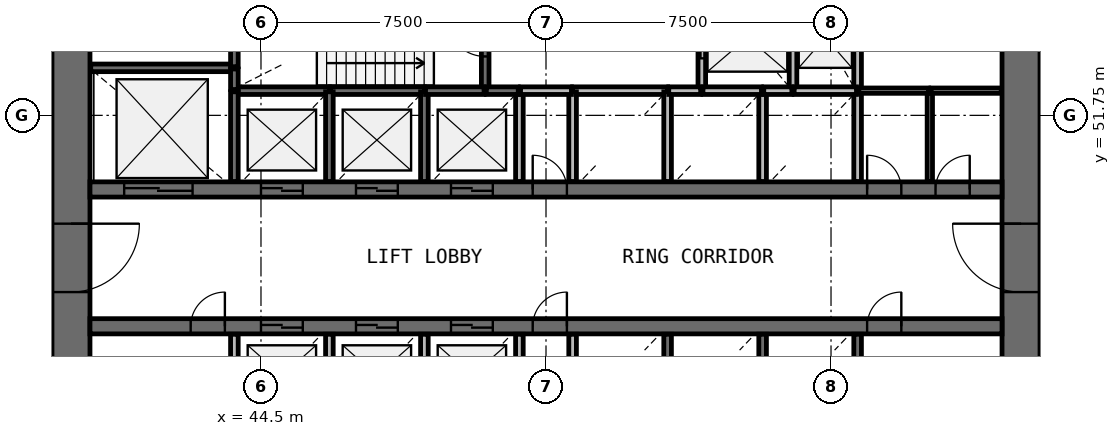
"""IFC4 building model, lengths in metres.
Left out: names, types, materials, properties, quantities, classifications, styles, units other than length and angle.
Written with IfcOpenShell. Run it as: python <this file> out.ifc"""

import sys

from ifc_helpers import new_model, si_unit, direction, frame, frame_2d, origin, place, context, subcontext, project, spatial, rectangle, extrude, source, transform, mapped, element, fill, save


model = new_model("IFC4")
c1 = context("Model", 3, precision=1e-05, world=origin(), true_north=direction((0.0, 1.0)))
c2 = subcontext(c1, "Body", "Model", "MODEL_VIEW")
j1 = project(units=[si_unit("LENGTHUNIT", "METRE"), si_unit("PLANEANGLEUNIT", "RADIAN")], contexts=[c1])
p1 = place(None, origin())
s1 = spatial("IfcSite", under=j1, at=p1, CompositionType="ELEMENT")
p2 = place(p1, origin())
s2 = spatial("IfcBuilding", under=s1, at=p2, CompositionType="ELEMENT")
p3 = place(p2, frame((0.0, 0.0, 66.6)))
s3 = spatial("IfcBuildingStorey", under=s2, at=p3, CompositionType="ELEMENT", Elevation=66.6)
p4 = place(p3, frame((64.5, 38.0, 0.0), z_axis=(0.0, 0.0, 1.0), x_axis=(0.0, 1.0, 0.0)))
e1 = element("IfcWall", 1, at=p4, inside=s3, PredefinedType="SHEAR", context=c2, shape_type="SweptSolid", body=[
    extrude(rectangle(XDim=20.0, YDim=1.0, at=frame_2d((10.0, 0.0))), origin(), (0.0, 0.0, 1.0), 4.4),
])
p5 = place(p4, frame((9.1, 0.0, 0.0)))
e2 = element("IfcOpeningElement", 2, at=p5, cuts=e1, PredefinedType="OPENING", context=c2, shape_type="SweptSolid", body=[
    extrude(rectangle(XDim=1.8, YDim=2.1, at=frame_2d((0.9, 1.05))), frame((0.0, 0.51, 0.0), z_axis=(0.0, -1.0, 0.0), x_axis=(1.0, 0.0, 0.0)), (0.0, 0.0, 1.0), 1.02),
])
p6 = place(p3, frame((39.5, 58.0, 0.0), z_axis=(0.0, 0.0, 1.0), x_axis=(0.0, -1.0, 0.0)))
e3 = element("IfcWall", 3, at=p6, inside=s3, PredefinedType="SHEAR", context=c2, shape_type="SweptSolid", body=[
    extrude(rectangle(XDim=20.0, YDim=1.0, at=frame_2d((10.0, 0.0))), origin(), (0.0, 0.0, 1.0), 4.4),
])
p7 = place(p6, frame((9.1, 0.0, 0.0)))
e4 = element("IfcOpeningElement", 4, at=p7, cuts=e3, PredefinedType="OPENING", context=c2, shape_type="SweptSolid", body=[
    extrude(rectangle(XDim=1.8, YDim=2.1, at=frame_2d((0.9, 1.05))), frame((0.0, 0.51, 0.0), z_axis=(0.0, -1.0, 0.0), x_axis=(1.0, 0.0, 0.0)), (0.0, 0.0, 1.0), 1.02),
])
p8 = place(p3, frame((40.0, 49.8, 0.0), z_axis=(0.0, 0.0, 1.0), x_axis=(1.0, 0.0, 0.0)))
e5 = element("IfcWall", 5, at=p8, inside=s3, PredefinedType="SHEAR", context=c2, shape_type="SweptSolid", body=[
    extrude(rectangle(XDim=24.0, YDim=0.4, at=frame_2d((12.0, 0.0))), origin(), (0.0, 0.0, 1.0), 4.4),
])
p9 = place(p8, frame((4.5, 0.0, 0.0)))
e6 = element("IfcOpeningElement", 6, at=p9, cuts=e5, PredefinedType="OPENING", context=c2, shape_type="SweptSolid", body=[
    extrude(rectangle(XDim=1.1, YDim=2.1, at=frame_2d((0.55, 1.05))), frame((0.0, 0.21, 0.0), z_axis=(0.0, -1.0, 0.0), x_axis=(1.0, 0.0, 0.0)), (0.0, 0.0, 1.0), 0.42),
])
p10 = place(p8, frame((7.0, 0.0, 0.0)))
e7 = element("IfcOpeningElement", 7, at=p10, cuts=e5, PredefinedType="OPENING", context=c2, shape_type="SweptSolid", body=[
    extrude(rectangle(XDim=1.1, YDim=2.1, at=frame_2d((0.55, 1.05))), frame((0.0, 0.21, 0.0), z_axis=(0.0, -1.0, 0.0), x_axis=(1.0, 0.0, 0.0)), (0.0, 0.0, 1.0), 0.42),
])
p11 = place(p8, frame((9.5, 0.0, 0.0)))
e8 = element("IfcOpeningElement", 8, at=p11, cuts=e5, PredefinedType="OPENING", context=c2, shape_type="SweptSolid", body=[
    extrude(rectangle(XDim=1.1, YDim=2.1, at=frame_2d((0.55, 1.05))), frame((0.0, 0.21, 0.0), z_axis=(0.0, -1.0, 0.0), x_axis=(1.0, 0.0, 0.0)), (0.0, 0.0, 1.0), 0.42),
])
p12 = place(p8, frame((0.9, 0.0, 0.0)))
e9 = element("IfcOpeningElement", 9, at=p12, cuts=e5, PredefinedType="OPENING", context=c2, shape_type="SweptSolid", body=[
    extrude(rectangle(XDim=1.8, YDim=2.4, at=frame_2d((0.9, 1.2))), frame((0.0, 0.21, 0.0), z_axis=(0.0, -1.0, 0.0), x_axis=(1.0, 0.0, 0.0)), (0.0, 0.0, 1.0), 0.42),
])
p13 = place(p8, frame((20.45, 0.0, 0.0)))
e10 = element("IfcOpeningElement", 10, at=p13, cuts=e5, PredefinedType="OPENING", context=c2, shape_type="SweptSolid", body=[
    extrude(rectangle(XDim=0.9, YDim=2.1, at=frame_2d((0.45, 1.05))), frame((0.0, 0.21, 0.0), z_axis=(0.0, -1.0, 0.0), x_axis=(1.0, 0.0, 0.0)), (0.0, 0.0, 1.0), 0.42),
])
p14 = place(p8, frame((22.25, 0.0, 0.0)))
e11 = element("IfcOpeningElement", 11, at=p14, cuts=e5, PredefinedType="OPENING", context=c2, shape_type="SweptSolid", body=[
    extrude(rectangle(XDim=0.9, YDim=2.1, at=frame_2d((0.45, 1.05))), frame((0.0, 0.21, 0.0), z_axis=(0.0, -1.0, 0.0), x_axis=(1.0, 0.0, 0.0)), (0.0, 0.0, 1.0), 0.42),
])
p15 = place(p8, frame((11.65, 0.0, 0.0)))
e12 = element("IfcOpeningElement", 12, at=p15, cuts=e5, PredefinedType="OPENING", context=c2, shape_type="SweptSolid", body=[
    extrude(rectangle(XDim=0.9, YDim=2.1, at=frame_2d((0.45, 1.05))), frame((0.0, 0.21, 0.0), z_axis=(0.0, -1.0, 0.0), x_axis=(1.0, 0.0, 0.0)), (0.0, 0.0, 1.0), 0.42),
])
p16 = place(p3, frame((40.0, 46.2, 0.0), z_axis=(0.0, 0.0, 1.0), x_axis=(1.0, 0.0, 0.0)))
e13 = element("IfcWall", 13, at=p16, inside=s3, PredefinedType="SHEAR", context=c2, shape_type="SweptSolid", body=[
    extrude(rectangle(XDim=24.0, YDim=0.4, at=frame_2d((12.0, 0.0))), origin(), (0.0, 0.0, 1.0), 4.4),
])
p17 = place(p16, frame((4.5, 0.0, 0.0)))
e14 = element("IfcOpeningElement", 14, at=p17, cuts=e13, PredefinedType="OPENING", context=c2, shape_type="SweptSolid", body=[
    extrude(rectangle(XDim=1.1, YDim=2.1, at=frame_2d((0.55, 1.05))), frame((0.0, 0.21, 0.0), z_axis=(0.0, -1.0, 0.0), x_axis=(1.0, 0.0, 0.0)), (0.0, 0.0, 1.0), 0.42),
])
p18 = place(p16, frame((7.0, 0.0, 0.0)))
e15 = element("IfcOpeningElement", 15, at=p18, cuts=e13, PredefinedType="OPENING", context=c2, shape_type="SweptSolid", body=[
    extrude(rectangle(XDim=1.1, YDim=2.1, at=frame_2d((0.55, 1.05))), frame((0.0, 0.21, 0.0), z_axis=(0.0, -1.0, 0.0), x_axis=(1.0, 0.0, 0.0)), (0.0, 0.0, 1.0), 0.42),
])
p19 = place(p16, frame((9.5, 0.0, 0.0)))
e16 = element("IfcOpeningElement", 16, at=p19, cuts=e13, PredefinedType="OPENING", context=c2, shape_type="SweptSolid", body=[
    extrude(rectangle(XDim=1.1, YDim=2.1, at=frame_2d((0.55, 1.05))), frame((0.0, 0.21, 0.0), z_axis=(0.0, -1.0, 0.0), x_axis=(1.0, 0.0, 0.0)), (0.0, 0.0, 1.0), 0.42),
])
p20 = place(p16, frame((20.45, 0.0, 0.0)))
e17 = element("IfcOpeningElement", 17, at=p20, cuts=e13, PredefinedType="OPENING", context=c2, shape_type="SweptSolid", body=[
    extrude(rectangle(XDim=0.9, YDim=2.1, at=frame_2d((0.45, 1.05))), frame((0.0, 0.21, 0.0), z_axis=(0.0, -1.0, 0.0), x_axis=(1.0, 0.0, 0.0)), (0.0, 0.0, 1.0), 0.42),
])
p21 = place(p16, frame((2.65, 0.0, 0.0)))
e18 = element("IfcOpeningElement", 18, at=p21, cuts=e13, PredefinedType="OPENING", context=c2, shape_type="SweptSolid", body=[
    extrude(rectangle(XDim=0.9, YDim=2.1, at=frame_2d((0.45, 1.05))), frame((0.0, 0.21, 0.0), z_axis=(0.0, -1.0, 0.0), x_axis=(1.0, 0.0, 0.0)), (0.0, 0.0, 1.0), 0.42),
])
p22 = place(p16, frame((11.65, 0.0, 0.0)))
e19 = element("IfcOpeningElement", 19, at=p22, cuts=e13, PredefinedType="OPENING", context=c2, shape_type="SweptSolid", body=[
    extrude(rectangle(XDim=0.9, YDim=2.1, at=frame_2d((0.45, 1.05))), frame((0.0, 0.21, 0.0), z_axis=(0.0, -1.0, 0.0), x_axis=(1.0, 0.0, 0.0)), (0.0, 0.0, 1.0), 0.42),
])
p23 = place(p3, frame((43.8, 53.0, 0.0), z_axis=(0.0, 0.0, 1.0), x_axis=(-1.0, 0.0, 0.0)))
e20 = element("IfcWall", 20, at=p23, inside=s3, PredefinedType="SOLIDWALL", context=c2, shape_type="SweptSolid", body=[
    extrude(rectangle(XDim=3.78, YDim=0.2, at=frame_2d((1.89, 0.0))), origin(), (0.0, 0.0, 1.0), 3.95),
])
p24 = place(p3, frame((50.4, 52.4, 0.0), z_axis=(0.0, 0.0, 1.0), x_axis=(0.0, 1.0, 0.0)))
e21 = element("IfcWall", 21, at=p24, inside=s3, PredefinedType="SOLIDWALL", context=c2, shape_type="SweptSolid", body=[
    extrude(rectangle(XDim=2.77, YDim=0.2, at=frame_2d((1.385, 0.0))), origin(), (0.0, 0.0, 1.0), 3.95),
])
p25 = place(p24, frame((0.9, 0.0, 0.0)))
e22 = element("IfcOpeningElement", 22, at=p25, cuts=e21, PredefinedType="OPENING", context=c2, shape_type="SweptSolid", body=[
    extrude(rectangle(XDim=1.0, YDim=2.1, at=frame_2d((0.5, 1.05))), frame((0.0, 0.11, 0.0), z_axis=(0.0, -1.0, 0.0), x_axis=(1.0, 0.0, 0.0)), (0.0, 0.0, 1.0), 0.22),
])
p26 = place(p3, frame((56.1, 55.17, 0.0), z_axis=(0.0, 0.0, 1.0), x_axis=(0.0, -1.0, 0.0)))
e23 = element("IfcWall", 23, at=p26, inside=s3, PredefinedType="SOLIDWALL", context=c2, shape_type="SweptSolid", body=[
    extrude(rectangle(XDim=2.77, YDim=0.2, at=frame_2d((1.385, 0.0))), origin(), (0.0, 0.0, 1.0), 3.95),
])
p27 = place(p26, frame((0.82, 0.0, 0.0)))
e24 = element("IfcOpeningElement", 24, at=p27, cuts=e23, PredefinedType="OPENING", context=c2, shape_type="SweptSolid", body=[
    extrude(rectangle(XDim=1.1, YDim=2.1, at=frame_2d((0.55, 1.05))), frame((0.0, 0.11, 0.0), z_axis=(0.0, -1.0, 0.0), x_axis=(1.0, 0.0, 0.0)), (0.0, 0.0, 1.0), 0.22),
])
for number, where, z_axis, x_axis in (
    (25, (58.5, 52.4, 0.0), (0.0, 0.0, 1.0), (0.0, 1.0, 0.0)),
    (26, (60.2, 52.4, 0.0), (0.0, 0.0, 1.0), (0.0, 1.0, 0.0)),
):
    element("IfcWall", number, at=place(p3, frame(where, z_axis=z_axis, x_axis=x_axis)), inside=s3, PredefinedType="SOLIDWALL", context=c2, shape_type="SweptSolid", body=[
        extrude(rectangle(XDim=2.8, YDim=0.2, at=frame_2d((1.4, 0.0))), origin(), (0.0, 0.0, 1.0), 3.95),
    ])
p28 = place(p3, frame((46.3, 52.4, 0.0), z_axis=(0.0, 0.0, 1.0), x_axis=(-1.0, 0.0, 0.0)))
e27 = element("IfcWall", 27, at=p28, inside=s3, PredefinedType="SOLIDWALL", context=c2, shape_type="SweptSolid", body=[
    extrude(rectangle(XDim=2.5, YDim=0.2, at=frame_2d((1.25, 0.0))), origin(), (0.0, 0.0, 1.0), 3.95),
])
p29 = place(p3, frame((48.8, 52.4, 0.0), z_axis=(0.0, 0.0, 1.0), x_axis=(-1.0, 0.0, 0.0)))
e28 = element("IfcWall", 28, at=p29, inside=s3, PredefinedType="SOLIDWALL", context=c2, shape_type="SweptSolid", body=[
    extrude(rectangle(XDim=2.47, YDim=0.2, at=frame_2d((1.235, 0.0))), origin(), (0.0, 0.0, 1.0), 3.95),
])
p30 = place(p3, frame((55.2, 52.4, 0.0), z_axis=(0.0, 0.0, 1.0), x_axis=(-1.0, 0.0, 0.0)))
e29 = element("IfcWall", 29, at=p30, inside=s3, PredefinedType="SOLIDWALL", context=c2, shape_type="SweptSolid", body=[
    extrude(rectangle(XDim=2.5, YDim=0.2, at=frame_2d((1.25, 0.0))), origin(), (0.0, 0.0, 1.0), 3.95),
])
for number, where, z_axis, x_axis in (
    (30, (43.8, 45.99, 0.0), (0.0, 0.0, 1.0), (0.0, -1.0, 0.0)),
    (31, (43.8, 52.37, 0.0), (0.0, 0.0, 1.0), (0.0, -1.0, 0.0)),
):
    element("IfcWall", number, at=place(p3, frame(where, z_axis=z_axis, x_axis=x_axis)), inside=s3, PredefinedType="SOLIDWALL", context=c2, shape_type="SweptSolid", body=[
        extrude(rectangle(XDim=2.36, YDim=0.2, at=frame_2d((1.18, 0.0))), origin(), (0.0, 0.0, 1.0), 3.95),
    ])
p31 = place(p3, frame((46.3, 43.6, 0.0), z_axis=(0.0, 0.0, 1.0), x_axis=(0.0, 1.0, 0.0)))
e32 = element("IfcWall", 32, at=p31, inside=s3, PredefinedType="SOLIDWALL", context=c2, shape_type="SweptSolid", body=[
    extrude(rectangle(XDim=2.39, YDim=0.2, at=frame_2d((1.195, 0.0))), origin(), (0.0, 0.0, 1.0), 3.95),
])
for number, where, z_axis, x_axis in (
    (33, (46.3, 50.01, 0.0), (0.0, 0.0, 1.0), (0.0, 1.0, 0.0)),
    (34, (48.8, 43.63, 0.0), (0.0, 0.0, 1.0), (0.0, 1.0, 0.0)),
    (35, (48.8, 50.01, 0.0), (0.0, 0.0, 1.0), (0.0, 1.0, 0.0)),
    (36, (51.3, 43.63, 0.0), (0.0, 0.0, 1.0), (0.0, 1.0, 0.0)),
):
    element("IfcWall", number, at=place(p3, frame(where, z_axis=z_axis, x_axis=x_axis)), inside=s3, PredefinedType="SOLIDWALL", context=c2, shape_type="SweptSolid", body=[
        extrude(rectangle(XDim=2.36, YDim=0.2, at=frame_2d((1.18, 0.0))), origin(), (0.0, 0.0, 1.0), 3.95),
    ])
for number, where, z_axis, x_axis in (
    (37, (51.3, 50.01, 0.0), (0.0, 0.0, 1.0), (0.0, 1.0, 0.0)),
    (38, (52.7, 45.99, 0.0), (0.0, 0.0, 1.0), (0.0, -1.0, 0.0)),
):
    element("IfcWall", number, at=place(p3, frame(where, z_axis=z_axis, x_axis=x_axis)), inside=s3, PredefinedType="SOLIDWALL", context=c2, shape_type="SweptSolid", body=[
        extrude(rectangle(XDim=2.39, YDim=0.2, at=frame_2d((1.195, 0.0))), origin(), (0.0, 0.0, 1.0), 3.95),
    ])
for number, where, z_axis, x_axis in (
    (39, (52.7, 52.37, 0.0), (0.0, 0.0, 1.0), (0.0, -1.0, 0.0)),
    (40, (55.2, 43.63, 0.0), (0.0, 0.0, 1.0), (0.0, 1.0, 0.0)),
    (41, (55.2, 50.01, 0.0), (0.0, 0.0, 1.0), (0.0, 1.0, 0.0)),
    (42, (57.7, 43.63, 0.0), (0.0, 0.0, 1.0), (0.0, 1.0, 0.0)),
):
    element("IfcWall", number, at=place(p3, frame(where, z_axis=z_axis, x_axis=x_axis)), inside=s3, PredefinedType="SOLIDWALL", context=c2, shape_type="SweptSolid", body=[
        extrude(rectangle(XDim=2.36, YDim=0.2, at=frame_2d((1.18, 0.0))), origin(), (0.0, 0.0, 1.0), 3.95),
    ])
p32 = place(p3, frame((57.7, 50.01, 0.0), z_axis=(0.0, 0.0, 1.0), x_axis=(0.0, 1.0, 0.0)))
e43 = element("IfcWall", 43, at=p32, inside=s3, PredefinedType="SOLIDWALL", context=c2, shape_type="SweptSolid", body=[
    extrude(rectangle(XDim=2.39, YDim=0.2, at=frame_2d((1.195, 0.0))), origin(), (0.0, 0.0, 1.0), 3.95),
])
for number, where, z_axis, x_axis in (
    (44, (60.2, 43.63, 0.0), (0.0, 0.0, 1.0), (0.0, 1.0, 0.0)),
    (45, (60.2, 50.01, 0.0), (0.0, 0.0, 1.0), (0.0, 1.0, 0.0)),
):
    element("IfcWall", number, at=place(p3, frame(where, z_axis=z_axis, x_axis=x_axis)), inside=s3, PredefinedType="SOLIDWALL", context=c2, shape_type="SweptSolid", body=[
        extrude(rectangle(XDim=2.36, YDim=0.2, at=frame_2d((1.18, 0.0))), origin(), (0.0, 0.0, 1.0), 3.95),
    ])
p33 = place(p3, frame((43.8, 55.17, 0.0), z_axis=(0.0, 0.0, 1.0), x_axis=(0.0, -1.0, 0.0)))
e46 = element("IfcWall", 46, at=p33, inside=s3, PredefinedType="SOLIDWALL", context=c2, shape_type="SweptSolid", body=[
    extrude(rectangle(XDim=2.14, YDim=0.2, at=frame_2d((1.07, 0.0))), origin(), (0.0, 0.0, 1.0), 3.95),
])
p34 = place(p3, frame((60.17, 52.4, 0.0), z_axis=(0.0, 0.0, 1.0), x_axis=(-1.0, 0.0, 0.0)))
e47 = element("IfcWall", 47, at=p34, inside=s3, PredefinedType="SOLIDWALL", context=c2, shape_type="SweptSolid", body=[
    extrude(rectangle(XDim=1.64, YDim=0.2, at=frame_2d((0.82, 0.0))), origin(), (0.0, 0.0, 1.0), 3.95),
])
for number, where, z_axis, x_axis in (
    (48, (50.37, 52.4, 0.0), (0.0, 0.0, 1.0), (-1.0, 0.0, 0.0)),
    (49, (57.67, 52.4, 0.0), (0.0, 0.0, 1.0), (-1.0, 0.0, 0.0)),
):
    element("IfcWall", number, at=place(p3, frame(where, z_axis=z_axis, x_axis=x_axis)), inside=s3, PredefinedType="SOLIDWALL", context=c2, shape_type="SweptSolid", body=[
        extrude(rectangle(XDim=1.54, YDim=0.2, at=frame_2d((0.77, 0.0))), origin(), (0.0, 0.0, 1.0), 3.95),
    ])
p35 = place(p3, frame((51.33, 52.4, 0.0), z_axis=(0.0, 0.0, 1.0), x_axis=(1.0, 0.0, 0.0)))
e50 = element("IfcWall", 50, at=p35, inside=s3, PredefinedType="SOLIDWALL", context=c2, shape_type="SweptSolid", body=[
    extrude(rectangle(XDim=1.34, YDim=0.2, at=frame_2d((0.67, 0.0))), origin(), (0.0, 0.0, 1.0), 3.95),
])
for number, where, z_axis, x_axis in (
    (51, (51.27, 52.4, 0.0), (0.0, 0.0, 1.0), (-1.0, 0.0, 0.0)),
    (52, (56.07, 52.4, 0.0), (0.0, 0.0, 1.0), (-1.0, 0.0, 0.0)),
):
    element("IfcWall", number, at=place(p3, frame(where, z_axis=z_axis, x_axis=x_axis)), inside=s3, PredefinedType="SOLIDWALL", context=c2, shape_type="SweptSolid", body=[
        extrude(rectangle(XDim=0.84, YDim=0.2, at=frame_2d((0.42, 0.0))), origin(), (0.0, 0.0, 1.0), 3.95),
    ])
p36 = place(p3, frame((58.47, 52.4, 0.0), z_axis=(0.0, 0.0, 1.0), x_axis=(-1.0, 0.0, 0.0)))
e53 = element("IfcWall", 53, at=p36, inside=s3, PredefinedType="SOLIDWALL", context=c2, shape_type="SweptSolid", body=[
    extrude(rectangle(XDim=0.74, YDim=0.2, at=frame_2d((0.37, 0.0))), origin(), (0.0, 0.0, 1.0), 3.95),
])
p37 = place(p3, frame((43.8, 52.43, 0.0), z_axis=(0.0, 0.0, 1.0), x_axis=(0.0, 1.0, 0.0)))
e54 = element("IfcWall", 54, at=p37, inside=s3, PredefinedType="SOLIDWALL", context=c2, shape_type="SweptSolid", body=[
    extrude(rectangle(XDim=0.54, YDim=0.2, at=frame_2d((0.27, 0.0))), origin(), (0.0, 0.0, 1.0), 3.95),
])
p38 = place(p3, frame((62.1, 50.01, 0.0), z_axis=(0.0, 0.0, 1.0), x_axis=(0.0, 1.0, 0.0)))
e55 = element("IfcWall", 55, at=p38, inside=s3, PredefinedType="PARTITIONING", context=c2, shape_type="SweptSolid", body=[
    extrude(rectangle(XDim=2.39, YDim=0.14, at=frame_2d((1.195, 0.0))), origin(), (0.0, 0.0, 1.0), 3.05),
])
p39 = place(p3, frame((62.07, 52.4, 0.0), z_axis=(0.0, 0.0, 1.0), x_axis=(-1.0, 0.0, 0.0)))
e56 = element("IfcWall", 56, at=p39, inside=s3, PredefinedType="PARTITIONING", context=c2, shape_type="SweptSolid", body=[
    extrude(rectangle(XDim=1.84, YDim=0.14, at=frame_2d((0.92, 0.0))), origin(), (0.0, 0.0, 1.0), 3.05),
])
p40 = place(p3, frame((63.98, 52.4, 0.0), z_axis=(0.0, 0.0, 1.0), x_axis=(-1.0, 0.0, 0.0)))
e57 = element("IfcWall", 57, at=p40, inside=s3, PredefinedType="PARTITIONING", context=c2, shape_type="SweptSolid", body=[
    extrude(rectangle(XDim=1.85, YDim=0.14, at=frame_2d((0.925, 0.0))), origin(), (0.0, 0.0, 1.0), 3.05),
])
m1 = source(origin(), c2, "Body", "SweptSolid", [
    extrude(rectangle(XDim=1.8, YDim=2.1, at=frame_2d((0.9, 1.05))), frame((0.0, 0.025, 0.0), z_axis=(0.0, -1.0, 0.0), x_axis=(1.0, 0.0, 0.0)), (0.0, 0.0, 1.0), 0.05),
])
p41 = place(p7, origin())
e58 = element("IfcDoor", 58, at=p41, inside=s3, OperationType="SINGLE_SWING_LEFT", PredefinedType="DOOR", context=c2, shape_type="MappedRepresentation", body=[
    mapped(m1, transform((0.0, 0.0, 0.0), scale=1.0)),
])
fill(e4, e58)
p42 = place(p5, origin())
e59 = element("IfcDoor", 59, at=p42, inside=s3, OperationType="SINGLE_SWING_RIGHT", PredefinedType="DOOR", context=c2, shape_type="MappedRepresentation", body=[
    mapped(m1, transform((0.0, 0.0, 0.0), scale=1.0)),
])
fill(e2, e59)
m2 = source(origin(), c2, "Body", "SweptSolid", [
    extrude(rectangle(XDim=1.1, YDim=2.1, at=frame_2d((0.55, 1.05))), frame((0.0, 0.025, 0.0), z_axis=(0.0, -1.0, 0.0), x_axis=(1.0, 0.0, 0.0)), (0.0, 0.0, 1.0), 0.05),
])
p43 = place(p9, origin())
e60 = element("IfcDoor", 60, at=p43, inside=s3, OperationType="DOUBLE_DOOR_SLIDING", PredefinedType="USERDEFINED", context=c2, shape_type="MappedRepresentation", body=[
    mapped(m2, transform((0.0, 0.0, 0.0), scale=1.0)),
])
fill(e6, e60)
p44 = place(p10, origin())
e61 = element("IfcDoor", 61, at=p44, inside=s3, OperationType="DOUBLE_DOOR_SLIDING", PredefinedType="USERDEFINED", context=c2, shape_type="MappedRepresentation", body=[
    mapped(m2, transform((0.0, 0.0, 0.0), scale=1.0)),
])
fill(e7, e61)
p45 = place(p11, origin())
e62 = element("IfcDoor", 62, at=p45, inside=s3, OperationType="DOUBLE_DOOR_SLIDING", PredefinedType="USERDEFINED", context=c2, shape_type="MappedRepresentation", body=[
    mapped(m2, transform((0.0, 0.0, 0.0), scale=1.0)),
])
fill(e8, e62)
p46 = place(p17, origin())
e63 = element("IfcDoor", 63, at=p46, inside=s3, OperationType="DOUBLE_DOOR_SLIDING", PredefinedType="USERDEFINED", context=c2, shape_type="MappedRepresentation", body=[
    mapped(m2, transform((0.0, 0.0, 0.0), scale=1.0)),
])
fill(e14, e63)
p47 = place(p18, origin())
e64 = element("IfcDoor", 64, at=p47, inside=s3, OperationType="DOUBLE_DOOR_SLIDING", PredefinedType="USERDEFINED", context=c2, shape_type="MappedRepresentation", body=[
    mapped(m2, transform((0.0, 0.0, 0.0), scale=1.0)),
])
fill(e15, e64)
p48 = place(p19, origin())
e65 = element("IfcDoor", 65, at=p48, inside=s3, OperationType="DOUBLE_DOOR_SLIDING", PredefinedType="USERDEFINED", context=c2, shape_type="MappedRepresentation", body=[
    mapped(m2, transform((0.0, 0.0, 0.0), scale=1.0)),
])
fill(e16, e65)
p49 = place(p27, origin())
e66 = element("IfcDoor", 66, at=p49, inside=s3, OperationType="DOUBLE_DOOR_SLIDING", PredefinedType="USERDEFINED", context=c2, shape_type="MappedRepresentation", body=[
    mapped(m2, transform((0.0, 0.0, 0.0), scale=1.0)),
])
fill(e24, e66)
m3 = source(origin(), c2, "Body", "SweptSolid", [
    extrude(rectangle(XDim=1.8, YDim=2.4, at=frame_2d((0.9, 1.2))), frame((0.0, 0.025, 0.0), z_axis=(0.0, -1.0, 0.0), x_axis=(1.0, 0.0, 0.0)), (0.0, 0.0, 1.0), 0.05),
])
p50 = place(p12, origin())
e67 = element("IfcDoor", 67, at=p50, inside=s3, OperationType="DOUBLE_DOOR_SLIDING", PredefinedType="USERDEFINED", context=c2, shape_type="MappedRepresentation", body=[
    mapped(m3, transform((0.0, 0.0, 0.0), scale=1.0)),
])
fill(e9, e67)
m4 = source(origin(), c2, "Body", "SweptSolid", [
    extrude(rectangle(XDim=1.0, YDim=2.1, at=frame_2d((0.5, 1.05))), frame((0.0, 0.025, 0.0), z_axis=(0.0, -1.0, 0.0), x_axis=(1.0, 0.0, 0.0)), (0.0, 0.0, 1.0), 0.05),
])
p51 = place(p25, origin())
e68 = element("IfcDoor", 68, at=p51, inside=s3, OperationType="SINGLE_SWING_RIGHT", PredefinedType="DOOR", context=c2, shape_type="MappedRepresentation", body=[
    mapped(m4, transform((0.0, 0.0, 0.0), scale=1.0)),
])
fill(e22, e68)
m5 = source(origin(), c2, "Body", "SweptSolid", [
    extrude(rectangle(XDim=0.9, YDim=2.1, at=frame_2d((0.45, 1.05))), frame((0.0, 0.025, 0.0), z_axis=(0.0, -1.0, 0.0), x_axis=(1.0, 0.0, 0.0)), (0.0, 0.0, 1.0), 0.05),
])
p52 = place(p20, origin())
e69 = element("IfcDoor", 69, at=p52, inside=s3, OperationType="SINGLE_SWING_RIGHT", PredefinedType="DOOR", context=c2, shape_type="MappedRepresentation", body=[
    mapped(m5, transform((0.0, 0.0, 0.0), scale=1.0)),
])
fill(e17, e69)
p53 = place(p13, origin())
e70 = element("IfcDoor", 70, at=p53, inside=s3, OperationType="SINGLE_SWING_LEFT", PredefinedType="DOOR", context=c2, shape_type="MappedRepresentation", body=[
    mapped(m5, transform((0.0, 0.0, 0.0), scale=1.0)),
])
fill(e10, e70)
p54 = place(p14, origin())
e71 = element("IfcDoor", 71, at=p54, inside=s3, OperationType="SINGLE_SWING_RIGHT", PredefinedType="DOOR", context=c2, shape_type="MappedRepresentation", body=[
    mapped(m5, transform((0.0, 0.0, 0.0), scale=1.0)),
])
fill(e11, e71)
p55 = place(p21, origin())
e72 = element("IfcDoor", 72, at=p55, inside=s3, OperationType="SINGLE_SWING_RIGHT", PredefinedType="DOOR", context=c2, shape_type="MappedRepresentation", body=[
    mapped(m5, transform((0.0, 0.0, 0.0), scale=1.0)),
])
fill(e18, e72)
p56 = place(p15, origin())
e73 = element("IfcDoor", 73, at=p56, inside=s3, OperationType="SINGLE_SWING_LEFT", PredefinedType="DOOR", context=c2, shape_type="MappedRepresentation", body=[
    mapped(m5, transform((0.0, 0.0, 0.0), scale=1.0)),
])
fill(e12, e73)
p57 = place(p22, origin())
e74 = element("IfcDoor", 74, at=p57, inside=s3, OperationType="SINGLE_SWING_RIGHT", PredefinedType="DOOR", context=c2, shape_type="MappedRepresentation", body=[
    mapped(m5, transform((0.0, 0.0, 0.0), scale=1.0)),
])
fill(e19, e74)
save(model, sys.argv[1])
